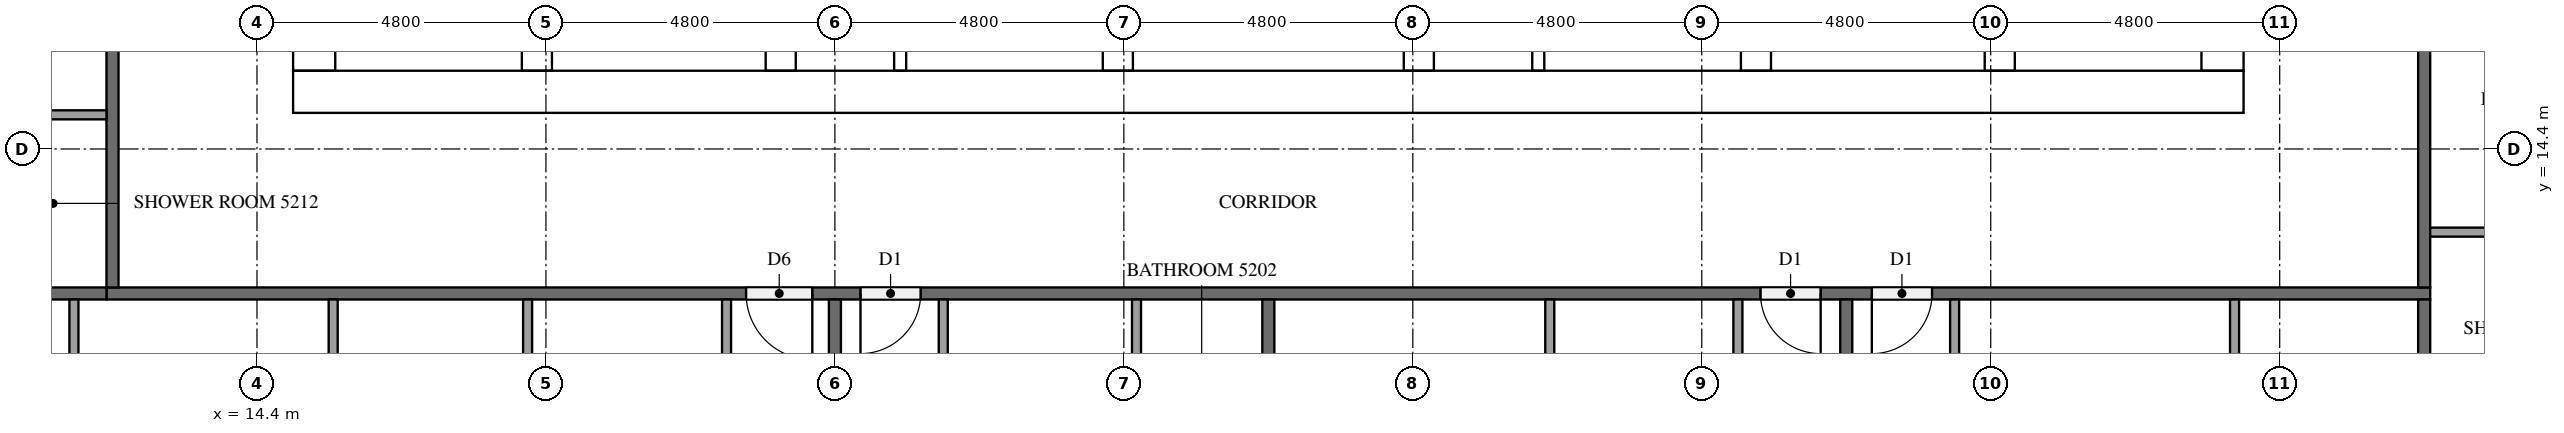
"""IFC4 building model, lengths in metres.
Left out: names, types, materials, properties, quantities, classifications, styles, units other than length and angle.
Written with IfcOpenShell. Run it as: python <this file> out.ifc"""

import sys

from ifc_helpers import new_model, si_unit, direction, frame, frame_2d, origin, place, context, subcontext, project, spatial, rectangle, extrude, element, fill, save


model = new_model("IFC4")
c1 = context("Model", 3, precision=1e-05, world=origin(), true_north=direction((0.0, 1.0)))
c2 = subcontext(c1, "Body", "Model", "MODEL_VIEW")
j1 = project(units=[si_unit("LENGTHUNIT", "METRE"), si_unit("PLANEANGLEUNIT", "RADIAN")], contexts=[c1])
p1 = place(None, origin())
s1 = spatial("IfcSite", under=j1, at=p1, CompositionType="ELEMENT")
p2 = place(p1, origin())
s2 = spatial("IfcBuilding", under=s1, at=p2, CompositionType="ELEMENT")
p3 = place(p2, frame((0.0, 0.0, 199.9)))
s3 = spatial("IfcBuildingStorey", under=s2, at=p3, CompositionType="ELEMENT", Elevation=199.9)
p4 = place(p3, frame((15.0, 15.35, 0.0), z_axis=(0.0, 0.0, 1.0), x_axis=(1.0, 0.0, 0.0)))
e1 = element("IfcWall", 1, at=p4, inside=s3, PredefinedType="SHEAR", context=c2, shape_type="SweptSolid", body=[
    extrude(rectangle(XDim=32.4, YDim=0.7, at=frame_2d((16.2, 0.0))), origin(), (0.0, 0.0, 1.0), 3.1),
])
p5 = place(p4, frame((15.3, 0.0, 0.0)))
e2 = element("IfcOpeningElement", 2, at=p5, cuts=e1, PredefinedType="OPENING", context=c2, shape_type="SweptSolid", body=[
    extrude(rectangle(XDim=1.8, YDim=2.1, at=frame_2d((0.9, 1.05))), frame((0.0, 0.36, 0.0), z_axis=(0.0, -1.0, 0.0), x_axis=(1.0, 0.0, 0.0)), (0.0, 0.0, 1.0), 0.72),
])
p6 = place(p3, frame((15.35, 15.7, 0.0), z_axis=(0.0, 0.0, 1.0), x_axis=(0.0, 1.0, 0.0)))
e3 = element("IfcWall", 3, at=p6, inside=s3, PredefinedType="SHEAR", context=c2, shape_type="SweptSolid", body=[
    extrude(rectangle(XDim=21.4, YDim=0.7, at=frame_2d((10.7, 0.0))), origin(), (0.0, 0.0, 1.0), 3.1),
])
p7 = place(p6, frame((5.06, 0.0, 0.0)))
e4 = element("IfcOpeningElement", 4, at=p7, cuts=e3, PredefinedType="OPENING", context=c2, shape_type="SweptSolid", body=[
    extrude(rectangle(XDim=1.2, YDim=2.1, at=frame_2d((0.6, 1.05))), frame((0.0, 0.36, 0.0), z_axis=(0.0, -1.0, 0.0), x_axis=(1.0, 0.0, 0.0)), (0.0, 0.0, 1.0), 0.72),
])
p8 = place(p3, frame((47.05, 15.7, 0.0), z_axis=(0.0, 0.0, 1.0), x_axis=(0.0, 1.0, 0.0)))
e5 = element("IfcWall", 5, at=p8, inside=s3, PredefinedType="SHEAR", context=c2, shape_type="SweptSolid", body=[
    extrude(rectangle(XDim=21.4, YDim=0.7, at=frame_2d((10.7, 0.0))), origin(), (0.0, 0.0, 1.0), 3.1),
])
p9 = place(p8, frame((10.4, 0.0, 0.0)))
e6 = element("IfcOpeningElement", 6, at=p9, cuts=e5, PredefinedType="OPENING", context=c2, shape_type="SweptSolid", body=[
    extrude(rectangle(XDim=1.2, YDim=2.1, at=frame_2d((0.6, 1.05))), frame((0.0, 0.36, 0.0), z_axis=(0.0, -1.0, 0.0), x_axis=(1.0, 0.0, 0.0)), (0.0, 0.0, 1.0), 0.72),
])
p10 = place(p3, frame((19.05, 15.7, 0.0), z_axis=(0.0, 0.0, 1.0), x_axis=(0.0, 1.0, 0.0)))
e7 = element("IfcWall", 7, at=p10, inside=s3, PredefinedType="SHEAR", context=c2, shape_type="SweptSolid", body=[
    extrude(rectangle(XDim=15.3, YDim=0.5, at=frame_2d((7.65, 0.0))), origin(), (0.0, 0.0, 1.0), 3.1),
])
p11 = place(p10, frame((9.75, 0.0, 0.0)))
e8 = element("IfcOpeningElement", 8, at=p11, cuts=e7, PredefinedType="OPENING", context=c2, shape_type="SweptSolid", body=[
    extrude(rectangle(XDim=1.1, YDim=2.1, at=frame_2d((0.55, 1.05))), frame((0.0, 0.26, 0.0), z_axis=(0.0, -1.0, 0.0), x_axis=(1.0, 0.0, 0.0)), (0.0, 0.0, 1.0), 0.52),
])
p12 = place(p10, frame((13.25, 0.0, 0.0)))
e9 = element("IfcOpeningElement", 9, at=p12, cuts=e7, PredefinedType="OPENING", context=c2, shape_type="SweptSolid", body=[
    extrude(rectangle(XDim=1.1, YDim=2.1, at=frame_2d((0.55, 1.05))), frame((0.0, 0.26, 0.0), z_axis=(0.0, -1.0, 0.0), x_axis=(1.0, 0.0, 0.0)), (0.0, 0.0, 1.0), 0.52),
])
p13 = place(p10, frame((0.5, 0.0, 0.0)))
e10 = element("IfcOpeningElement", 10, at=p13, cuts=e7, PredefinedType="OPENING", context=c2, shape_type="SweptSolid", body=[
    extrude(rectangle(XDim=1.2, YDim=2.1, at=frame_2d((0.6, 1.05))), frame((0.0, 0.26, 0.0), z_axis=(0.0, -1.0, 0.0), x_axis=(1.0, 0.0, 0.0)), (0.0, 0.0, 1.0), 0.52),
])
p14 = place(p3, frame((23.1, 15.7, 0.0), z_axis=(0.0, 0.0, 1.0), x_axis=(0.0, 1.0, 0.0)))
e11 = element("IfcWall", 11, at=p14, inside=s3, PredefinedType="SHEAR", context=c2, shape_type="SweptSolid", body=[
    extrude(rectangle(XDim=21.4, YDim=0.5, at=frame_2d((10.7, 0.0))), origin(), (0.0, 0.0, 1.0), 3.1),
])
p15 = place(p3, frame((39.3, 15.7, 0.0), z_axis=(0.0, 0.0, 1.0), x_axis=(0.0, 1.0, 0.0)))
e12 = element("IfcWall", 12, at=p15, inside=s3, PredefinedType="SHEAR", context=c2, shape_type="SweptSolid", body=[
    extrude(rectangle(XDim=8.55, YDim=0.5, at=frame_2d((4.275, 0.0))), origin(), (0.0, 0.0, 1.0), 3.1),
])
p16 = place(p3, frame((43.35, 15.7, 0.0), z_axis=(0.0, 0.0, 1.0), x_axis=(0.0, 1.0, 0.0)))
e13 = element("IfcWall", 13, at=p16, inside=s3, PredefinedType="SHEAR", context=c2, shape_type="SweptSolid", body=[
    extrude(rectangle(XDim=8.55, YDim=0.5, at=frame_2d((4.275, 0.0))), origin(), (0.0, 0.0, 1.0), 3.1),
])
p17 = place(p16, frame((0.5, 0.0, 0.0)))
e14 = element("IfcOpeningElement", 14, at=p17, cuts=e13, PredefinedType="OPENING", context=c2, shape_type="SweptSolid", body=[
    extrude(rectangle(XDim=1.2, YDim=2.1, at=frame_2d((0.6, 1.05))), frame((0.0, 0.26, 0.0), z_axis=(0.0, -1.0, 0.0), x_axis=(1.0, 0.0, 0.0)), (0.0, 0.0, 1.0), 0.52),
])
for number, where, z_axis, x_axis in (
    (15, (28.7, 15.7, 0.0), (0.0, 0.0, 1.0), (0.0, 1.0, 0.0)),
    (16, (33.7, 15.7, 0.0), (0.0, 0.0, 1.0), (0.0, 1.0, 0.0)),
):
    element("IfcWall", number, at=place(p3, frame(where, z_axis=z_axis, x_axis=x_axis)), inside=s3, PredefinedType="SHEAR", context=c2, shape_type="SweptSolid", body=[
        extrude(rectangle(XDim=2.8, YDim=0.5, at=frame_2d((1.4, 0.0))), origin(), (0.0, 0.0, 1.0), 3.1),
    ])
for number, where, z_axis, x_axis in (
    (17, (25.084, 15.7, 0.0), (0.0, 0.0, 1.0), (0.0, 1.0, 0.0)),
    (18, (35.684, 15.7, 0.0), (0.0, 0.0, 1.0), (0.0, 1.0, 0.0)),
):
    element("IfcWall", number, at=place(p3, frame(where, z_axis=z_axis, x_axis=x_axis)), inside=s3, PredefinedType="PARTITIONING", context=c2, shape_type="SweptSolid", body=[
        extrude(rectangle(XDim=2.8, YDim=0.2, at=frame_2d((1.4, 0.0))), origin(), (0.0, 0.0, 1.0), 3.1),
    ])
p18 = place(p3, frame((50.5, 12.0, 0.0), z_axis=(0.0, 0.0, 1.0), x_axis=(-1.0, 0.0, 0.0)))
e19 = element("IfcWall", 19, at=p18, inside=s3, PredefinedType="PARTITIONING", context=c2, shape_type="SweptSolid", body=[
    extrude(rectangle(XDim=38.6, YDim=0.2, at=frame_2d((19.3, 0.0))), origin(), (0.0, 0.0, 1.0), 3.1),
])
p19 = place(p18, frame((26.875, 0.0, 0.0)))
e20 = element("IfcOpeningElement", 20, at=p19, cuts=e19, PredefinedType="OPENING", context=c2, shape_type="SweptSolid", body=[
    extrude(rectangle(XDim=1.1, YDim=2.1, at=frame_2d((0.55, 1.05))), frame((0.0, 0.11, 0.0), z_axis=(0.0, -1.0, 0.0), x_axis=(1.0, 0.0, 0.0)), (0.0, 0.0, 1.0), 0.22),
])
p20 = place(p18, frame((25.075, 0.0, 0.0)))
e21 = element("IfcOpeningElement", 21, at=p20, cuts=e19, PredefinedType="OPENING", context=c2, shape_type="SweptSolid", body=[
    extrude(rectangle(XDim=1.0, YDim=2.1, at=frame_2d((0.5, 1.05))), frame((0.0, 0.11, 0.0), z_axis=(0.0, -1.0, 0.0), x_axis=(1.0, 0.0, 0.0)), (0.0, 0.0, 1.0), 0.22),
])
p21 = place(p18, frame((10.125, 0.0, 0.0)))
e22 = element("IfcOpeningElement", 22, at=p21, cuts=e19, PredefinedType="OPENING", context=c2, shape_type="SweptSolid", body=[
    extrude(rectangle(XDim=1.0, YDim=2.1, at=frame_2d((0.5, 1.05))), frame((0.0, 0.11, 0.0), z_axis=(0.0, -1.0, 0.0), x_axis=(1.0, 0.0, 0.0)), (0.0, 0.0, 1.0), 0.22),
])
p22 = place(p18, frame((8.275, 0.0, 0.0)))
e23 = element("IfcOpeningElement", 23, at=p22, cuts=e19, PredefinedType="OPENING", context=c2, shape_type="SweptSolid", body=[
    extrude(rectangle(XDim=1.0, YDim=2.1, at=frame_2d((0.5, 1.05))), frame((0.0, 0.11, 0.0), z_axis=(0.0, -1.0, 0.0), x_axis=(1.0, 0.0, 0.0)), (0.0, 0.0, 1.0), 0.22),
])
p23 = place(p3, frame((50.4, 40.7, 0.0), z_axis=(0.0, 0.0, 1.0), x_axis=(0.0, -1.0, 0.0)))
e24 = element("IfcWall", 24, at=p23, inside=s3, PredefinedType="PARTITIONING", context=c2, shape_type="SweptSolid", body=[
    extrude(rectangle(XDim=28.6, YDim=0.2, at=frame_2d((14.3, 0.0))), origin(), (0.0, 0.0, 1.0), 3.1),
])
p24 = place(p23, frame((21.875, 0.0, 0.0)))
e25 = element("IfcOpeningElement", 25, at=p24, cuts=e24, PredefinedType="OPENING", context=c2, shape_type="SweptSolid", body=[
    extrude(rectangle(XDim=1.1, YDim=2.1, at=frame_2d((0.55, 1.05))), frame((0.0, 0.11, 0.0), z_axis=(0.0, -1.0, 0.0), x_axis=(1.0, 0.0, 0.0)), (0.0, 0.0, 1.0), 0.22),
])
p25 = place(p23, frame((7.525, 0.0, 0.0)))
e26 = element("IfcOpeningElement", 26, at=p25, cuts=e24, PredefinedType="OPENING", context=c2, shape_type="SweptSolid", body=[
    extrude(rectangle(XDim=1.0, YDim=2.1, at=frame_2d((0.5, 1.05))), frame((0.0, 0.11, 0.0), z_axis=(0.0, -1.0, 0.0), x_axis=(1.0, 0.0, 0.0)), (0.0, 0.0, 1.0), 0.22),
])
p26 = place(p23, frame((5.675, 0.0, 0.0)))
e27 = element("IfcOpeningElement", 27, at=p26, cuts=e24, PredefinedType="OPENING", context=c2, shape_type="SweptSolid", body=[
    extrude(rectangle(XDim=1.0, YDim=2.1, at=frame_2d((0.5, 1.05))), frame((0.0, 0.11, 0.0), z_axis=(0.0, -1.0, 0.0), x_axis=(1.0, 0.0, 0.0)), (0.0, 0.0, 1.0), 0.22),
])
p27 = place(p3, frame((12.0, 12.1, 0.0), z_axis=(0.0, 0.0, 1.0), x_axis=(0.0, 1.0, 0.0)))
e28 = element("IfcWall", 28, at=p27, inside=s3, PredefinedType="PARTITIONING", context=c2, shape_type="SweptSolid", body=[
    extrude(rectangle(XDim=28.6, YDim=0.2, at=frame_2d((14.3, 0.0))), origin(), (0.0, 0.0, 1.0), 3.1),
])
p28 = place(p27, frame((21.925, 0.0, 0.0)))
e29 = element("IfcOpeningElement", 29, at=p28, cuts=e28, PredefinedType="OPENING", context=c2, shape_type="SweptSolid", body=[
    extrude(rectangle(XDim=1.0, YDim=2.1, at=frame_2d((0.5, 1.05))), frame((0.0, 0.11, 0.0), z_axis=(0.0, -1.0, 0.0), x_axis=(1.0, 0.0, 0.0)), (0.0, 0.0, 1.0), 0.22),
])
p29 = place(p27, frame((14.725, 0.0, 0.0)))
e30 = element("IfcOpeningElement", 30, at=p29, cuts=e28, PredefinedType="OPENING", context=c2, shape_type="SweptSolid", body=[
    extrude(rectangle(XDim=1.0, YDim=2.1, at=frame_2d((0.5, 1.05))), frame((0.0, 0.11, 0.0), z_axis=(0.0, -1.0, 0.0), x_axis=(1.0, 0.0, 0.0)), (0.0, 0.0, 1.0), 0.22),
])
p30 = place(p27, frame((12.875, 0.0, 0.0)))
e31 = element("IfcOpeningElement", 31, at=p30, cuts=e28, PredefinedType="OPENING", context=c2, shape_type="SweptSolid", body=[
    extrude(rectangle(XDim=1.0, YDim=2.1, at=frame_2d((0.5, 1.05))), frame((0.0, 0.11, 0.0), z_axis=(0.0, -1.0, 0.0), x_axis=(1.0, 0.0, 0.0)), (0.0, 0.0, 1.0), 0.22),
])
p31 = place(p3, frame((24.0, 11.9, 0.0), z_axis=(0.0, 0.0, 1.0), x_axis=(0.0, -1.0, 0.0)))
e32 = element("IfcWall", 32, at=p31, inside=s3, PredefinedType="PARTITIONING", context=c2, shape_type="SweptSolid", body=[
    extrude(rectangle(XDim=11.8, YDim=0.2, at=frame_2d((5.9, 0.0))), origin(), (0.0, 0.0, 1.0), 3.1),
])
p32 = place(p3, frame((4.9, 12.0, 0.0), z_axis=(0.0, 0.0, 1.0), x_axis=(1.0, 0.0, 0.0)))
e33 = element("IfcWall", 33, at=p32, inside=s3, PredefinedType="PARTITIONING", context=c2, shape_type="SweptSolid", body=[
    extrude(rectangle(XDim=7.0, YDim=0.2, at=frame_2d((3.5, 0.0))), origin(), (0.0, 0.0, 1.0), 3.1),
])
for number, where, z_axis, x_axis in (
    (34, (31.2, 11.9, 0.0), (0.0, 0.0, 1.0), (0.0, -1.0, 0.0)),
    (35, (40.8, 11.9, 0.0), (0.0, 0.0, 1.0), (0.0, -1.0, 0.0)),
    (36, (50.4, 11.9, 0.0), (0.0, 0.0, 1.0), (0.0, -1.0, 0.0)),
):
    element("IfcWall", number, at=place(p3, frame(where, z_axis=z_axis, x_axis=x_axis)), inside=s3, PredefinedType="PARTITIONING", context=c2, shape_type="SweptSolid", body=[
        extrude(rectangle(XDim=11.8, YDim=0.2, at=frame_2d((5.9, 0.0))), origin(), (0.0, 0.0, 1.0), 3.1),
    ])
for number, where, z_axis, x_axis in (
    (37, (18.895, 11.9, 0.0), (0.0, 0.0, 1.0), (0.0, -1.0, 0.0)),
    (38, (15.666, 11.9, 0.0), (0.0, 0.0, 1.0), (0.0, -1.0, 0.0)),
    (39, (11.359, 11.9, 0.0), (0.0, 0.0, 1.0), (0.0, -1.0, 0.0)),
):
    element("IfcWall", number, at=place(p3, frame(where, z_axis=z_axis, x_axis=x_axis)), inside=s3, PredefinedType="PARTITIONING", context=c2, shape_type="SweptSolid", body=[
        extrude(rectangle(XDim=4.175, YDim=0.15, at=frame_2d((2.087, 0.0))), origin(), (0.0, 0.0, 1.0), 3.1),
    ])
p33 = place(p3, frame((22.2, 11.9, 0.0), z_axis=(0.0, 0.0, 1.0), x_axis=(0.0, -1.0, 0.0)))
e40 = element("IfcWall", 40, at=p33, inside=s3, PredefinedType="PARTITIONING", context=c2, shape_type="SweptSolid", body=[
    extrude(rectangle(XDim=4.325, YDim=0.15, at=frame_2d((2.163, 0.0))), origin(), (0.0, 0.0, 1.0), 3.1),
])
p34 = place(p3, frame((29.01, 11.9, 0.0), z_axis=(0.0, 0.0, 1.0), x_axis=(0.0, -1.0, 0.0)))
e41 = element("IfcWall", 41, at=p34, inside=s3, PredefinedType="PARTITIONING", context=c2, shape_type="SweptSolid", body=[
    extrude(rectangle(XDim=3.575, YDim=0.15, at=frame_2d((1.788, 0.0))), origin(), (0.0, 0.0, 1.0), 3.1),
])
p35 = place(p3, frame((25.8, 11.9, 0.0), z_axis=(0.0, 0.0, 1.0), x_axis=(0.0, -1.0, 0.0)))
e42 = element("IfcWall", 42, at=p35, inside=s3, PredefinedType="PARTITIONING", context=c2, shape_type="SweptSolid", body=[
    extrude(rectangle(XDim=3.725, YDim=0.15, at=frame_2d((1.862, 0.0))), origin(), (0.0, 0.0, 1.0), 3.1),
])
p36 = place(p3, frame((35.875, 11.9, 0.0), z_axis=(0.0, 0.0, 1.0), x_axis=(0.0, -1.0, 0.0)))
e43 = element("IfcWall", 43, at=p36, inside=s3, PredefinedType="PARTITIONING", context=c2, shape_type="SweptSolid", body=[
    extrude(rectangle(XDim=4.475, YDim=0.15, at=frame_2d((2.237, 0.0))), origin(), (0.0, 0.0, 1.0), 3.1),
])
p37 = place(p3, frame((39.0, 11.9, 0.0), z_axis=(0.0, 0.0, 1.0), x_axis=(0.0, -1.0, 0.0)))
e44 = element("IfcWall", 44, at=p37, inside=s3, PredefinedType="PARTITIONING", context=c2, shape_type="SweptSolid", body=[
    extrude(rectangle(XDim=4.625, YDim=0.15, at=frame_2d((2.312, 0.0))), origin(), (0.0, 0.0, 1.0), 3.1),
])
p38 = place(p3, frame((47.25, 11.9, 0.0), z_axis=(0.0, 0.0, 1.0), x_axis=(0.0, -1.0, 0.0)))
e45 = element("IfcWall", 45, at=p38, inside=s3, PredefinedType="PARTITIONING", context=c2, shape_type="SweptSolid", body=[
    extrude(rectangle(XDim=3.125, YDim=0.15, at=frame_2d((1.562, 0.0))), origin(), (0.0, 0.0, 1.0), 3.1),
])
p39 = place(p3, frame((42.6, 11.9, 0.0), z_axis=(0.0, 0.0, 1.0), x_axis=(0.0, -1.0, 0.0)))
e46 = element("IfcWall", 46, at=p39, inside=s3, PredefinedType="PARTITIONING", context=c2, shape_type="SweptSolid", body=[
    extrude(rectangle(XDim=3.275, YDim=0.15, at=frame_2d((1.637, 0.0))), origin(), (0.0, 0.0, 1.0), 3.1),
])
p40 = place(p3, frame((50.5, 13.019, 0.0), z_axis=(0.0, 0.0, 1.0), x_axis=(1.0, 0.0, 0.0)))
e47 = element("IfcWall", 47, at=p40, inside=s3, PredefinedType="PARTITIONING", context=c2, shape_type="SweptSolid", body=[
    extrude(rectangle(XDim=4.175, YDim=0.15, at=frame_2d((2.087, 0.0))), origin(), (0.0, 0.0, 1.0), 3.1),
])
p41 = place(p3, frame((11.9, 14.967, 0.0), z_axis=(0.0, 0.0, 1.0), x_axis=(-1.0, 0.0, 0.0)))
e48 = element("IfcWall", 48, at=p41, inside=s3, PredefinedType="PARTITIONING", context=c2, shape_type="SweptSolid", body=[
    extrude(rectangle(XDim=1.775, YDim=0.15, at=frame_2d((0.887, 0.0))), origin(), (0.0, 0.0, 1.0), 3.1),
])
p42 = place(p5, frame((1.8, 0.0, 0.0), z_axis=(0.0, 0.0, 1.0), x_axis=(-1.0, 0.0, 0.0)))
e49 = element("IfcDoor", 49, at=p42, inside=s3, OperationType="DOUBLE_DOOR_SINGLE_SWING", PredefinedType="DOOR", context=c2, shape_type="SweptSolid", body=[
    extrude(rectangle(XDim=1.8, YDim=2.1, at=frame_2d((0.9, 1.05))), frame((0.0, 0.025, 0.0), z_axis=(0.0, -1.0, 0.0), x_axis=(1.0, 0.0, 0.0)), (0.0, 0.0, 1.0), 0.05),
])
fill(e2, e49)
p43 = place(p19, origin())
e50 = element("IfcDoor", 50, at=p43, inside=s3, OperationType="SINGLE_SWING_LEFT", PredefinedType="DOOR", context=c2, shape_type="SweptSolid", body=[
    extrude(rectangle(XDim=1.1, YDim=2.1, at=frame_2d((0.55, 1.05))), frame((0.0, 0.025, 0.0), z_axis=(0.0, -1.0, 0.0), x_axis=(1.0, 0.0, 0.0)), (0.0, 0.0, 1.0), 0.05),
])
fill(e20, e50)
p44 = place(p20, origin())
e51 = element("IfcDoor", 51, at=p44, inside=s3, OperationType="SINGLE_SWING_RIGHT", PredefinedType="DOOR", context=c2, shape_type="SweptSolid", body=[
    extrude(rectangle(XDim=1.0, YDim=2.1, at=frame_2d((0.5, 1.05))), frame((0.0, 0.025, 0.0), z_axis=(0.0, -1.0, 0.0), x_axis=(1.0, 0.0, 0.0)), (0.0, 0.0, 1.0), 0.05),
])
fill(e21, e51)
p45 = place(p21, origin())
e52 = element("IfcDoor", 52, at=p45, inside=s3, OperationType="SINGLE_SWING_LEFT", PredefinedType="DOOR", context=c2, shape_type="SweptSolid", body=[
    extrude(rectangle(XDim=1.0, YDim=2.1, at=frame_2d((0.5, 1.05))), frame((0.0, 0.025, 0.0), z_axis=(0.0, -1.0, 0.0), x_axis=(1.0, 0.0, 0.0)), (0.0, 0.0, 1.0), 0.05),
])
fill(e22, e52)
p46 = place(p22, origin())
e53 = element("IfcDoor", 53, at=p46, inside=s3, OperationType="SINGLE_SWING_RIGHT", PredefinedType="DOOR", context=c2, shape_type="SweptSolid", body=[
    extrude(rectangle(XDim=1.0, YDim=2.1, at=frame_2d((0.5, 1.05))), frame((0.0, 0.025, 0.0), z_axis=(0.0, -1.0, 0.0), x_axis=(1.0, 0.0, 0.0)), (0.0, 0.0, 1.0), 0.05),
])
fill(e23, e53)
save(model, sys.argv[1])
